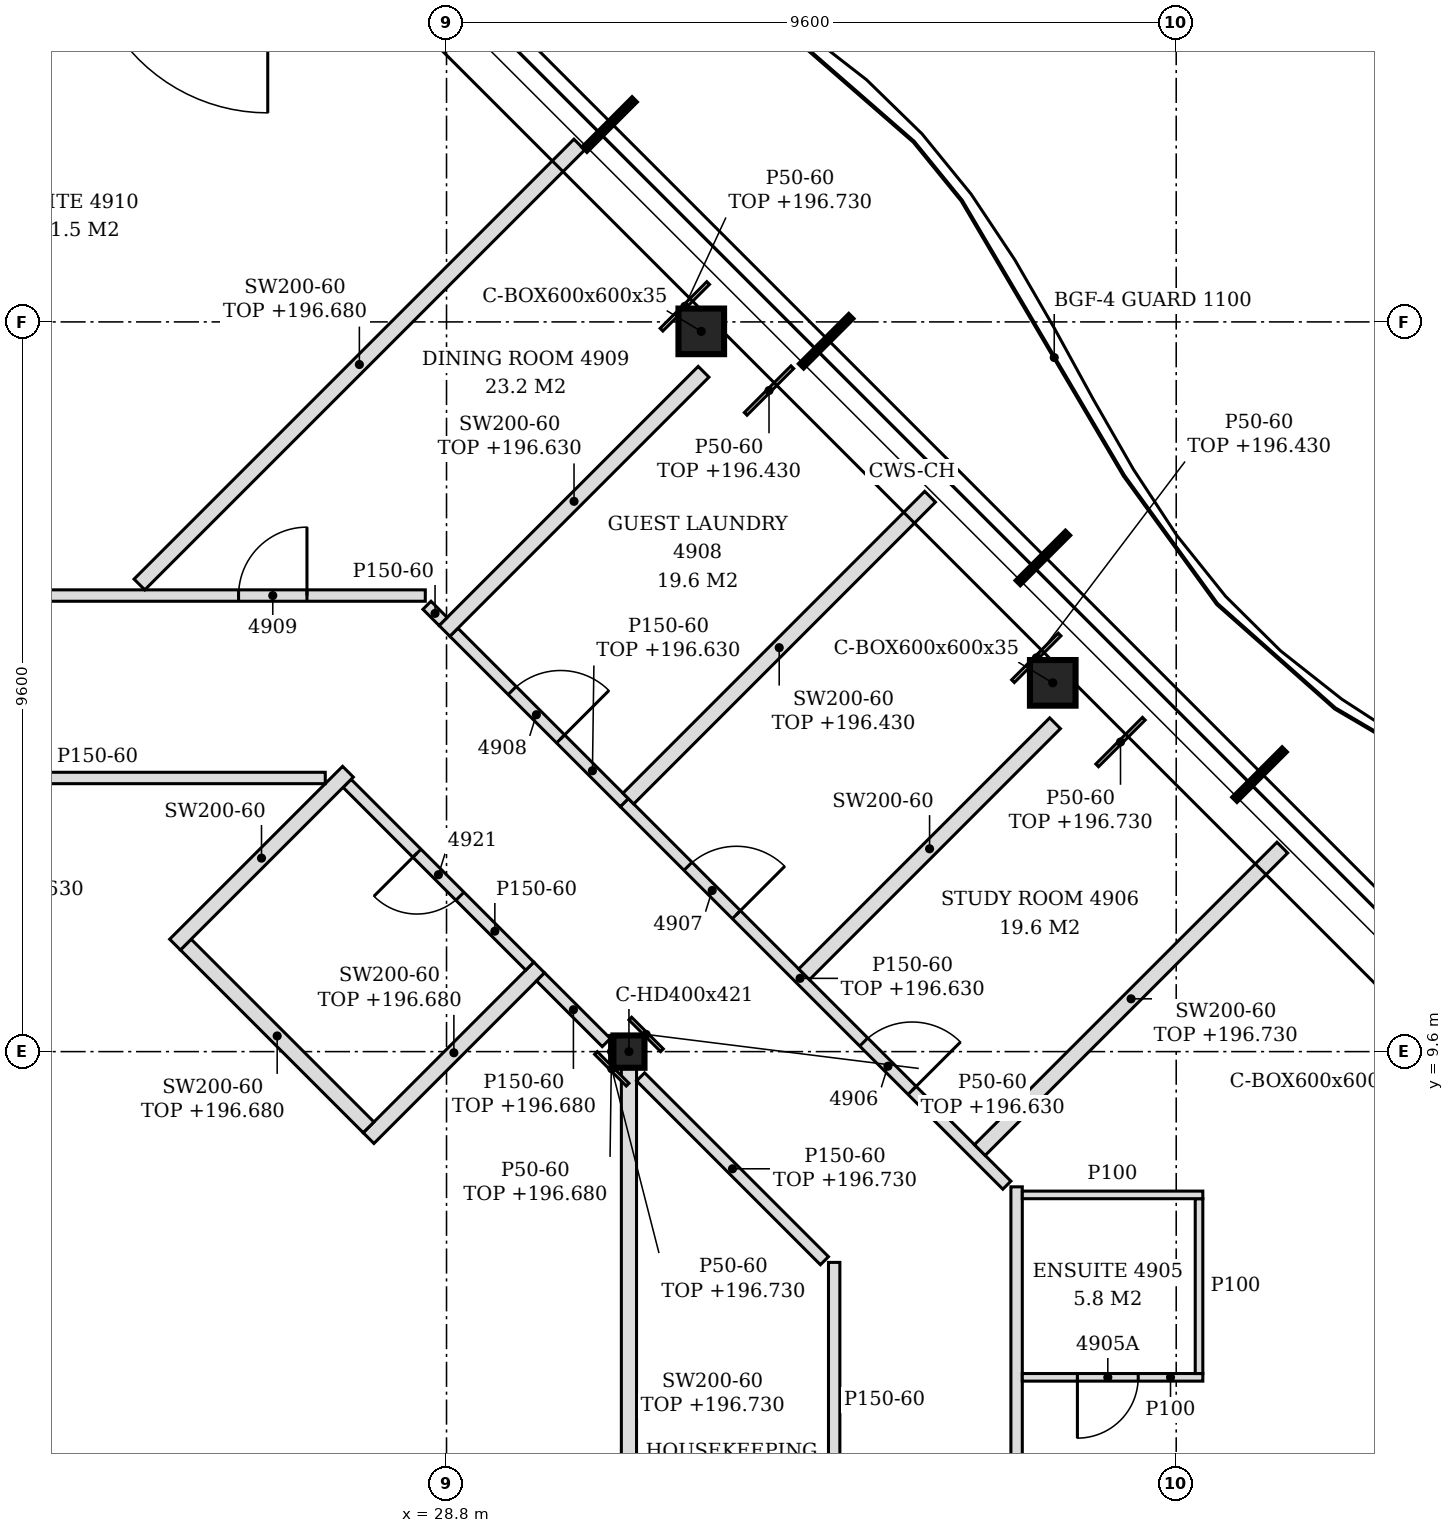
"""IFC4 building model, lengths in metres.
Left out: names, types, materials, properties, quantities, classifications, styles, units other than length and angle.
Written with IfcOpenShell. Run it as: python <this file> out.ifc"""

import sys

from ifc_helpers import new_model, si_unit, direction, frame, frame_2d, origin, origin_2d, place, context, subcontext, project, spatial, polyline, rectangle, hollow_rectangle, i_section, outline, extrude, clip, halfspace, element, fill, save


model = new_model("IFC4")
c1 = context("Model", 3, precision=1e-05, world=origin(), true_north=direction((0.0, 1.0)))
c2 = subcontext(c1, "Body", "Model", "MODEL_VIEW")
j1 = project(units=[si_unit("LENGTHUNIT", "METRE"), si_unit("PLANEANGLEUNIT", "RADIAN")], contexts=[c1])
p1 = place(None, origin())
s1 = spatial("IfcSite", under=j1, at=p1, CompositionType="ELEMENT")
p2 = place(p1, origin())
s2 = spatial("IfcBuilding", under=s1, at=p2, CompositionType="ELEMENT")
p3 = place(p2, frame((0.0, 0.0, 193.8)))
s3 = spatial("IfcBuildingStorey", under=s2, at=p3, CompositionType="ELEMENT", Elevation=193.8)
for number, where, z_axis, x_axis in (
    (1, (41.4, 9.827, -0.15), (0.183, -0.122, 0.976), (0.555, 0.832, 0.0)),
    (2, (36.776, 14.451, -0.15), (0.183, -0.122, 0.976), (0.555, 0.832, 0.0)),
):
    element("IfcColumn", number, at=place(p3, frame(where, z_axis=z_axis, x_axis=x_axis)), inside=s3, PredefinedType="COLUMN", context=c2, shape_type="Clipping", body=[
        clip(clip(extrude(hollow_rectangle(XDim=0.6, YDim=0.6, WallThickness=0.035, at=origin_2d()), origin(), (0.0, 0.0, 1.0), 3.69), halfspace(frame((0.0, 0.0, 0.021), z_axis=(0.0, 0.0, 1.0), x_axis=(1.0, 0.0, 0.0)), True)), halfspace(frame((0.0, 0.0, 3.668), z_axis=(0.0, 0.0, 1.0), x_axis=(1.0, 0.0, 0.0)), False)),
    ])
p4 = place(p3, frame((32.152, 19.076, -0.15), z_axis=(0.182857646312, -0.121927149838, 0.975549512489), x_axis=(0.554769659169, 0.83200398152, 0.0)))
e3 = element("IfcColumn", 3, at=p4, inside=s3, PredefinedType="COLUMN", context=c2, shape_type="Clipping", body=[
    clip(clip(extrude(hollow_rectangle(XDim=0.6, YDim=0.6, WallThickness=0.035, at=origin_2d()), origin(), (0.0, 0.0, 1.0), 3.69), halfspace(frame((0.0, 0.0, 0.021), z_axis=(0.0, 0.0, 1.0), x_axis=(1.0, 0.0, 0.0)), True)), halfspace(frame((0.0, 0.0, 3.668), z_axis=(0.0, 0.0, 1.0), x_axis=(1.0, 0.0, 0.0)), False)),
])
p5 = place(p3, frame((31.2, 9.6, -0.15), z_axis=(0.0, 0.0, 1.0), x_axis=(1.0, 0.0, 0.0)))
e4 = element("IfcColumn", 4, at=p5, inside=s3, PredefinedType="COLUMN", context=c2, shape_type="SweptSolid", body=[
    extrude(i_section(OverallWidth=0.409, OverallDepth=0.425, WebThickness=0.033, FlangeThickness=0.052, FilletRadius=0.015, at=origin_2d()), origin(), (0.0, 0.0, 1.0), 3.6),
])
p6 = place(p3, frame((36.3, -6.334, 0.0), z_axis=(0.0, 0.0, 1.0), x_axis=(0.0, 1.0, 0.0)))
e5 = element("IfcWall", 5, at=p6, inside=s3, PredefinedType="PARTITIONING", context=c2, shape_type="SweptSolid", body=[
    extrude(outline(polyline([(0.0, 0.0), (14.155, 0.0), (14.155, 3.45), (11.384, 3.45), (11.382, 2.93), (11.184, 2.93), (11.182, 3.45), (6.584, 3.45), (6.582, 2.93), (6.384, 2.93), (6.382, 3.45), (1.784, 3.45), (1.782, 2.93), (1.584, 2.93), (1.582, 3.45), (0.0, 3.45), (0.0, 0.0)])), frame((0.0, 0.075, 0.0), z_axis=(0.0, -1.0, 0.0), x_axis=(1.0, 0.0, 0.0)), (0.0, 0.0, 1.0), 0.15),
])
p7 = place(p6, frame((1.614, 0.0, 0.0)))
e6 = element("IfcOpeningElement", 6, at=p7, cuts=e5, PredefinedType="OPENING", context=c2, shape_type="SweptSolid", body=[
    extrude(rectangle(XDim=0.9, YDim=2.1, at=frame_2d((0.45, 1.05))), frame((0.0, 0.085, 0.0), z_axis=(0.0, -1.0, 0.0), x_axis=(1.0, 0.0, 0.0)), (0.0, 0.0, 1.0), 0.17),
])
p8 = place(p6, frame((8.729, 0.0, 0.0)))
e7 = element("IfcOpeningElement", 7, at=p8, cuts=e5, PredefinedType="OPENING", context=c2, shape_type="SweptSolid", body=[
    extrude(rectangle(XDim=0.9, YDim=2.1, at=frame_2d((0.45, 1.05))), frame((0.0, 0.085, 0.0), z_axis=(0.0, -1.0, 0.0), x_axis=(1.0, 0.0, 0.0)), (0.0, 0.0, 1.0), 0.17),
])
p9 = place(p3, frame((33.9, -1.125, 0.0), z_axis=(0.0, 0.0, 1.0), x_axis=(0.0, 1.0, 0.0)))
e8 = element("IfcWall", 8, at=p9, inside=s3, PredefinedType="PARTITIONING", context=c2, shape_type="SweptSolid", body=[
    extrude(outline(polyline([(0.0, 0.0), (7.952, 0.0), (7.952, 3.45), (6.175, 3.45), (6.173, 2.93), (5.975, 2.93), (5.973, 3.45), (1.375, 3.45), (1.373, 2.93), (1.175, 2.93), (1.173, 3.45), (0.0, 3.45), (0.0, 0.0)])), frame((0.0, 0.075, 0.0), z_axis=(0.0, -1.0, 0.0), x_axis=(1.0, 0.0, 0.0)), (0.0, 0.0, 1.0), 0.15),
])
p10 = place(p9, frame((3.435, 0.0, 0.0)))
e9 = element("IfcOpeningElement", 9, at=p10, cuts=e8, PredefinedType="OPENING", context=c2, shape_type="SweptSolid", body=[
    extrude(rectangle(XDim=0.9, YDim=2.1, at=frame_2d((0.45, 1.05))), frame((0.0, 0.085, 0.0), z_axis=(0.0, -1.0, 0.0), x_axis=(1.0, 0.0, 0.0)), (0.0, 0.0, 1.0), 0.17),
])
p11 = place(p3, frame((31.2, 0.212, 0.0), z_axis=(0.0, 0.0, 1.0), x_axis=(0.0, 1.0, 0.0)))
e10 = element("IfcWall", 10, at=p11, inside=s3, PredefinedType="PARTITIONING", context=c2, shape_type="SweptSolid", body=[
    extrude(rectangle(XDim=9.175, YDim=0.2, at=frame_2d((4.587, 0.0))), origin(), (0.0, 0.0, 1.0), 2.93),
])
p12 = place(p3, frame((36.375, 5.315, 0.0), z_axis=(0.0, 0.0, 1.0), x_axis=(1.0, 0.0, 0.0)))
e11 = element("IfcWall", 11, at=p12, inside=s3, PredefinedType="PARTITIONING", context=c2, shape_type="SweptSolid", body=[
    extrude(rectangle(XDim=2.375, YDim=0.1, at=frame_2d((1.188, 0.0))), origin(), (0.0, 0.0, 1.0), 3.45),
])
p13 = place(p12, frame((0.725, 0.0, 0.0)))
e12 = element("IfcOpeningElement", 12, at=p13, cuts=e11, PredefinedType="OPENING", context=c2, shape_type="SweptSolid", body=[
    extrude(rectangle(XDim=0.8, YDim=2.1, at=frame_2d((0.4, 1.05))), frame((0.0, 0.06, 0.0), z_axis=(0.0, -1.0, 0.0), x_axis=(1.0, 0.0, 0.0)), (0.0, 0.0, 1.0), 0.12),
])
p14 = place(p3, frame((38.7, 5.365, 0.0), z_axis=(0.0, 0.0, 1.0), x_axis=(0.0, 1.0, 0.0)))
e13 = element("IfcWall", 13, at=p14, inside=s3, PredefinedType="PARTITIONING", context=c2, shape_type="SweptSolid", body=[
    extrude(rectangle(XDim=2.3, YDim=0.1, at=frame_2d((1.15, 0.0))), origin(), (0.0, 0.0, 1.0), 3.45),
])
p15 = place(p3, frame((33.772, 6.849, 0.0), z_axis=(0.0, 0.0, 1.0), x_axis=(-0.707106781187, 0.707106781187, 0.0)))
e14 = element("IfcWall", 14, at=p15, inside=s3, PredefinedType="PARTITIONING", context=c2, shape_type="SweptSolid", body=[
    extrude(rectangle(XDim=3.421, YDim=0.15, at=frame_2d((1.71, 0.0))), origin(), (0.0, 0.0, 1.0), 2.93),
])
p16 = place(p3, frame((36.375, 7.715, 0.0), z_axis=(0.0, 0.0, 1.0), x_axis=(1.0, 0.0, 0.0)))
e15 = element("IfcWall", 15, at=p16, inside=s3, PredefinedType="PARTITIONING", context=c2, shape_type="SweptSolid", body=[
    extrude(rectangle(XDim=2.375, YDim=0.1, at=frame_2d((1.188, 0.0))), origin(), (0.0, 0.0, 1.0), 3.45),
])
p17 = place(p3, frame((36.172, 7.843, 0.0), z_axis=(0.0, 0.0, 1.0), x_axis=(-0.70712393086, 0.707089631097, 0.0)))
e16 = element("IfcWall", 16, at=p17, inside=s3, PredefinedType="PARTITIONING", context=c2, shape_type="SweptSolid", body=[
    extrude(rectangle(XDim=7.118, YDim=0.15, at=frame_2d((3.559, 0.0))), origin(), (0.0, 0.0, 1.0), 2.83),
])
p18 = place(p17, frame((1.763, 0.0, 0.0)))
e17 = element("IfcOpeningElement", 17, at=p18, cuts=e16, PredefinedType="OPENING", context=c2, shape_type="SweptSolid", body=[
    extrude(rectangle(XDim=0.9, YDim=2.1, at=frame_2d((0.45, 1.05))), frame((0.0, 0.085, 0.0), z_axis=(0.0, -1.0, 0.0), x_axis=(1.0, 0.0, 0.0)), (0.0, 0.0, 1.0), 0.17),
])
p19 = place(p17, frame((5.033, 0.0, 0.0)))
e18 = element("IfcOpeningElement", 18, at=p19, cuts=e16, PredefinedType="OPENING", context=c2, shape_type="SweptSolid", body=[
    extrude(rectangle(XDim=0.9, YDim=2.1, at=frame_2d((0.45, 1.05))), frame((0.0, 0.085, 0.0), z_axis=(0.0, -1.0, 0.0), x_axis=(1.0, 0.0, 0.0)), (0.0, 0.0, 1.0), 0.17),
])
p20 = place(p3, frame((35.816, 8.305, 0.0), z_axis=(0.0, 0.0, 1.0), x_axis=(0.707193537431, 0.707020014296, 0.0)))
e19 = element("IfcWall", 19, at=p20, inside=s3, PredefinedType="PARTITIONING", context=c2, shape_type="SweptSolid", body=[
    extrude(rectangle(XDim=5.628, YDim=0.2, at=frame_2d((2.814, 0.0))), origin(), (0.0, 0.0, 1.0), 2.93),
])
p21 = place(p3, frame((27.774, 8.462, 0.0), z_axis=(0.0, 0.0, 1.0), x_axis=(0.707106781187, 0.707106781187, 0.0)))
e20 = element("IfcWall", 20, at=p21, inside=s3, PredefinedType="PARTITIONING", context=c2, shape_type="SweptSolid", body=[
    extrude(rectangle(XDim=3.174, YDim=0.2, at=frame_2d((1.587, 0.0))), origin(), (0.0, 0.0, 1.0), 2.88),
])
p22 = place(p3, frame((27.774, 8.604, 0.0), z_axis=(0.0, 0.0, 1.0), x_axis=(-0.707142675843, 0.707070884708, 0.0)))
e21 = element("IfcWall", 21, at=p22, inside=s3, PredefinedType="PARTITIONING", context=c2, shape_type="SweptSolid", body=[
    extrude(rectangle(XDim=3.401, YDim=0.2, at=frame_2d((1.7, 0.0))), origin(), (0.0, 0.0, 1.0), 2.88),
])
p23 = place(p3, frame((30.902, 9.719, 0.0), z_axis=(0.0, 0.0, 1.0), x_axis=(-0.707406212347, 0.706807223175, 0.0)))
e22 = element("IfcWall", 22, at=p23, inside=s3, PredefinedType="PARTITIONING", context=c2, shape_type="SweptSolid", body=[
    extrude(rectangle(XDim=1.223, YDim=0.15, at=frame_2d((0.611, 0.0))), origin(), (0.0, 0.0, 1.0), 2.88),
])
p24 = place(p3, frame((33.504, 10.617, 0.0), z_axis=(0.0, 0.0, 1.0), x_axis=(0.707028369139, 0.70718518454, 0.0)))
e23 = element("IfcWall", 23, at=p24, inside=s3, PredefinedType="PARTITIONING", context=c2, shape_type="SweptSolid", body=[
    extrude(rectangle(XDim=4.671, YDim=0.2, at=frame_2d((2.335, 0.0))), origin(), (0.0, 0.0, 1.0), 3.45),
])
p25 = place(p3, frame((29.895, 10.725, 0.0), z_axis=(0.0, 0.0, 1.0), x_axis=(-0.706927244117, 0.707286272682, 0.0)))
e24 = element("IfcWall", 24, at=p25, inside=s3, PredefinedType="PARTITIONING", context=c2, shape_type="SweptSolid", body=[
    extrude(rectangle(XDim=3.4, YDim=0.15, at=frame_2d((1.7, 0.0))), origin(), (0.0, 0.0, 1.0), 3.45),
])
p26 = place(p25, frame((1.3, 0.0, 0.0)))
e25 = element("IfcOpeningElement", 25, at=p26, cuts=e24, PredefinedType="OPENING", context=c2, shape_type="SweptSolid", body=[
    extrude(rectangle(XDim=0.8, YDim=2.1, at=frame_2d((0.4, 1.05))), frame((0.0, 0.085, 0.0), z_axis=(0.0, -1.0, 0.0), x_axis=(1.0, 0.0, 0.0)), (0.0, 0.0, 1.0), 0.17),
])
p27 = place(p3, frame((25.228, 11.008, 0.0), z_axis=(0.0, 0.0, 1.0), x_axis=(0.707296501544, 0.706917009913, 0.0)))
e26 = element("IfcWall", 26, at=p27, inside=s3, PredefinedType="PARTITIONING", context=c2, shape_type="SweptSolid", body=[
    extrude(rectangle(XDim=3.217, YDim=0.2, at=frame_2d((1.608, 0.0))), origin(), (0.0, 0.0, 1.0), 3.45),
])
p28 = place(p3, frame((31.139, 12.876, 0.0), z_axis=(0.0, 0.0, 1.0), x_axis=(-0.707260784618, 0.706952744207, 0.0)))
e27 = element("IfcWall", 27, at=p28, inside=s3, PredefinedType="PARTITIONING", context=c2, shape_type="SweptSolid", body=[
    extrude(rectangle(XDim=3.17, YDim=0.15, at=frame_2d((1.585, 0.0))), origin(), (0.0, 0.0, 1.0), 2.83),
])
p29 = place(p28, frame((1.185, 0.0, 0.0)))
e28 = element("IfcOpeningElement", 28, at=p29, cuts=e27, PredefinedType="OPENING", context=c2, shape_type="SweptSolid", body=[
    extrude(rectangle(XDim=0.9, YDim=2.1, at=frame_2d((0.45, 1.05))), frame((0.0, 0.085, 0.0), z_axis=(0.0, -1.0, 0.0), x_axis=(1.0, 0.0, 0.0)), (0.0, 0.0, 1.0), 0.17),
])
p30 = place(p3, frame((31.192, 12.929, 0.0), z_axis=(0.0, 0.0, 1.0), x_axis=(0.70701981688, 0.707193734799, 0.0)))
e29 = element("IfcWall", 29, at=p30, inside=s3, PredefinedType="PARTITIONING", context=c2, shape_type="SweptSolid", body=[
    extrude(rectangle(XDim=5.615, YDim=0.2, at=frame_2d((2.808, 0.0))), origin(), (0.0, 0.0, 1.0), 2.63),
])
p31 = place(p3, frame((21.215, 13.2, 0.0), z_axis=(0.0, 0.0, 1.0), x_axis=(1.0, 0.0, 0.0)))
e30 = element("IfcWall", 30, at=p31, inside=s3, PredefinedType="PARTITIONING", context=c2, shape_type="SweptSolid", body=[
    extrude(rectangle(XDim=5.99, YDim=0.15, at=frame_2d((2.995, 0.0))), origin(), (0.0, 0.0, 1.0), 3.45),
])
p32 = place(p3, frame((28.773, 15.135, 0.0), z_axis=(0.0, 0.0, 1.0), x_axis=(0.707106781187, 0.707106781187, 0.0)))
e31 = element("IfcWall", 31, at=p32, inside=s3, PredefinedType="PARTITIONING", context=c2, shape_type="SweptSolid", body=[
    extrude(rectangle(XDim=4.821, YDim=0.2, at=frame_2d((2.411, 0.0))), origin(), (0.0, 0.0, 1.0), 2.83),
])
p33 = place(p3, frame((28.755, 15.259, 0.0), z_axis=(0.0, 0.0, 1.0), x_axis=(-0.706295414481, 0.707917217959, 0.0)))
e32 = element("IfcWall", 32, at=p33, inside=s3, PredefinedType="PARTITIONING", context=c2, shape_type="SweptSolid", body=[
    extrude(rectangle(XDim=0.301, YDim=0.15, at=frame_2d((0.15, 0.0))), origin(), (0.0, 0.0, 1.0), 3.45),
])
p34 = place(p3, frame((-4.875, 15.6, 0.0), z_axis=(0.0, 0.0, 1.0), x_axis=(1.0, 0.0, 0.0)))
e33 = element("IfcWall", 33, at=p34, inside=s3, PredefinedType="PARTITIONING", context=c2, shape_type="SweptSolid", body=[
    extrude(outline(polyline([(0.0, 0.0), (33.396, 0.0), (33.396, 3.45), (24.225, 3.45), (24.223, 2.83), (23.925, 2.83), (23.923, 3.45), (12.225, 3.45), (12.223, 2.83), (11.925, 2.83), (11.923, 3.45), (0.225, 3.45), (0.223, 3.03), (0.0, 3.03), (0.0, 0.0)])), frame((0.0, 0.075, 0.0), z_axis=(0.0, -1.0, 0.0), x_axis=(1.0, 0.0, 0.0)), (0.0, 0.0, 1.0), 0.15),
])
p35 = place(p34, frame((30.939, 0.0, 0.0)))
e34 = element("IfcOpeningElement", 34, at=p35, cuts=e33, PredefinedType="OPENING", context=c2, shape_type="SweptSolid", body=[
    extrude(rectangle(XDim=0.9, YDim=2.1, at=frame_2d((0.45, 1.05))), frame((0.0, 0.085, 0.0), z_axis=(0.0, -1.0, 0.0), x_axis=(1.0, 0.0, 0.0)), (0.0, 0.0, 1.0), 0.17),
])
p36 = place(p34, frame((27.188, 0.0, 0.0)))
e35 = element("IfcOpeningElement", 35, at=p36, cuts=e33, PredefinedType="OPENING", context=c2, shape_type="SweptSolid", body=[
    extrude(rectangle(XDim=0.9, YDim=2.1, at=frame_2d((0.45, 1.05))), frame((0.0, 0.085, 0.0), z_axis=(0.0, -1.0, 0.0), x_axis=(1.0, 0.0, 0.0)), (0.0, 0.0, 1.0), 0.17),
])
p37 = place(p34, frame((19.463, 0.0, 0.0)))
e36 = element("IfcOpeningElement", 36, at=p37, cuts=e33, PredefinedType="OPENING", context=c2, shape_type="SweptSolid", body=[
    extrude(rectangle(XDim=0.9, YDim=2.1, at=frame_2d((0.45, 1.05))), frame((0.0, 0.085, 0.0), z_axis=(0.0, -1.0, 0.0), x_axis=(1.0, 0.0, 0.0)), (0.0, 0.0, 1.0), 0.17),
])
p38 = place(p34, frame((5.406, 0.0, 0.0)))
e37 = element("IfcOpeningElement", 37, at=p38, cuts=e33, PredefinedType="OPENING", context=c2, shape_type="SweptSolid", body=[
    extrude(rectangle(XDim=0.9, YDim=2.1, at=frame_2d((0.45, 1.05))), frame((0.0, 0.085, 0.0), z_axis=(0.0, -1.0, 0.0), x_axis=(1.0, 0.0, 0.0)), (0.0, 0.0, 1.0), 0.17),
])
p39 = place(p3, frame((24.76, 15.746, 0.0), z_axis=(0.0, 0.0, 1.0), x_axis=(0.707106781187, 0.707106781187, 0.0)))
e38 = element("IfcWall", 38, at=p39, inside=s3, PredefinedType="PARTITIONING", context=c2, shape_type="SweptSolid", body=[
    extrude(rectangle(XDim=8.185, YDim=0.2, at=frame_2d((4.092, 0.0))), origin(), (0.0, 0.0, 1.0), 2.88),
])
p40 = place(p3, frame((30.97, 9.387, 0.0), z_axis=(0.0, 0.0, 1.0), x_axis=(0.0, 1.0, 0.0)))
e39 = element("IfcWall", 39, at=p40, inside=s3, PredefinedType="PARTITIONING", context=c2, shape_type="SweptSolid", body=[
    extrude(rectangle(XDim=0.425, YDim=0.05, at=frame_2d((0.212, 0.0))), origin(), (0.0, 0.0, 1.0), 2.88),
])
p41 = place(p3, frame((31.183, 9.165, 0.0), z_axis=(0.0, 0.0, 1.0), x_axis=(-0.707520656867, 0.70669266312, 0.0)))
e40 = element("IfcWall", 40, at=p41, inside=s3, PredefinedType="PARTITIONING", context=c2, shape_type="SweptSolid", body=[
    extrude(rectangle(XDim=0.59, YDim=0.05, at=frame_2d((0.295, 0.0))), origin(), (0.0, 0.0, 1.0), 2.93),
])
p42 = place(p3, frame((31.635, 9.618, 0.0), z_axis=(0.0, 0.0, 1.0), x_axis=(-0.707520656867, 0.70669266312, 0.0)))
e41 = element("IfcWall", 41, at=p42, inside=s3, PredefinedType="PARTITIONING", context=c2, shape_type="SweptSolid", body=[
    extrude(rectangle(XDim=0.59, YDim=0.05, at=frame_2d((0.295, 0.0))), origin(), (0.0, 0.0, 1.0), 2.83),
])
p43 = place(p3, frame((37.36, 13.366, 0.0), z_axis=(0.0, 0.0, 1.0), x_axis=(0.707106781187, 0.707106781187, 0.0)))
e42 = element("IfcWall", 42, at=p43, inside=s3, PredefinedType="PARTITIONING", context=c2, shape_type="SweptSolid", body=[
    extrude(rectangle(XDim=0.868, YDim=0.05, at=frame_2d((0.434, 0.0))), origin(), (0.0, 0.0, 1.0), 2.93),
])
p44 = place(p3, frame((36.253, 14.473, 0.0), z_axis=(0.0, 0.0, 1.0), x_axis=(0.706966105416, 0.707247428976, 0.0)))
e43 = element("IfcWall", 43, at=p44, inside=s3, PredefinedType="PARTITIONING", context=c2, shape_type="SweptSolid", body=[
    extrude(rectangle(XDim=0.868, YDim=0.05, at=frame_2d((0.434, 0.0))), origin(), (0.0, 0.0, 1.0), 2.63),
])
p45 = place(p3, frame((31.628, 19.098, 0.0), z_axis=(0.0, 0.0, 1.0), x_axis=(0.707106781187, 0.707106781187, 0.0)))
e44 = element("IfcWall", 44, at=p45, inside=s3, PredefinedType="PARTITIONING", context=c2, shape_type="SweptSolid", body=[
    extrude(rectangle(XDim=0.868, YDim=0.05, at=frame_2d((0.434, 0.0))), origin(), (0.0, 0.0, 1.0), 2.93),
])
p46 = place(p3, frame((32.736, 17.99, 0.0), z_axis=(0.0, 0.0, 1.0), x_axis=(0.707106781187, 0.707106781187, 0.0)))
e45 = element("IfcWall", 45, at=p46, inside=s3, PredefinedType="PARTITIONING", context=c2, shape_type="SweptSolid", body=[
    extrude(rectangle(XDim=0.868, YDim=0.05, at=frame_2d((0.434, 0.0))), origin(), (0.0, 0.0, 1.0), 2.63),
])
p47 = place(p13, frame((0.8, 0.0, 0.0), z_axis=(0.0, 0.0, 1.0), x_axis=(-1.0, 0.0, 0.0)))
e46 = element("IfcDoor", 46, at=p47, inside=s3, OperationType="SINGLE_SWING_RIGHT", PredefinedType="DOOR", context=c2, shape_type="SweptSolid", body=[
    extrude(rectangle(XDim=0.8, YDim=2.1, at=frame_2d((0.4, 1.05))), frame((0.0, 0.025, 0.0), z_axis=(0.0, -1.0, 0.0), x_axis=(1.0, 0.0, 0.0)), (0.0, 0.0, 1.0), 0.05),
])
fill(e12, e46)
p48 = place(p18, frame((0.9, 0.0, 0.0), z_axis=(0.0, 0.0, 1.0), x_axis=(-1.0, 0.0, 0.0)))
e47 = element("IfcDoor", 47, at=p48, inside=s3, OperationType="SINGLE_SWING_RIGHT", PredefinedType="DOOR", context=c2, shape_type="SweptSolid", body=[
    extrude(rectangle(XDim=0.9, YDim=2.1, at=frame_2d((0.45, 1.05))), frame((0.0, 0.025, 0.0), z_axis=(0.0, -1.0, 0.0), x_axis=(1.0, 0.0, 0.0)), (0.0, 0.0, 1.0), 0.05),
])
fill(e17, e47)
p49 = place(p19, frame((0.9, 0.0, 0.0), z_axis=(0.0, 0.0, 1.0), x_axis=(-1.0, 0.0, 0.0)))
e48 = element("IfcDoor", 48, at=p49, inside=s3, OperationType="SINGLE_SWING_RIGHT", PredefinedType="DOOR", context=c2, shape_type="SweptSolid", body=[
    extrude(rectangle(XDim=0.9, YDim=2.1, at=frame_2d((0.45, 1.05))), frame((0.0, 0.025, 0.0), z_axis=(0.0, -1.0, 0.0), x_axis=(1.0, 0.0, 0.0)), (0.0, 0.0, 1.0), 0.05),
])
fill(e18, e48)
p50 = place(p29, frame((0.9, 0.0, 0.0), z_axis=(0.0, 0.0, 1.0), x_axis=(-1.0, 0.0, 0.0)))
e49 = element("IfcDoor", 49, at=p50, inside=s3, OperationType="SINGLE_SWING_RIGHT", PredefinedType="DOOR", context=c2, shape_type="SweptSolid", body=[
    extrude(rectangle(XDim=0.9, YDim=2.1, at=frame_2d((0.45, 1.05))), frame((0.0, 0.025, 0.0), z_axis=(0.0, -1.0, 0.0), x_axis=(1.0, 0.0, 0.0)), (0.0, 0.0, 1.0), 0.05),
])
fill(e28, e49)
p51 = place(p35, origin())
e50 = element("IfcDoor", 50, at=p51, inside=s3, OperationType="SINGLE_SWING_RIGHT", PredefinedType="DOOR", context=c2, shape_type="SweptSolid", body=[
    extrude(rectangle(XDim=0.9, YDim=2.1, at=frame_2d((0.45, 1.05))), frame((0.0, 0.025, 0.0), z_axis=(0.0, -1.0, 0.0), x_axis=(1.0, 0.0, 0.0)), (0.0, 0.0, 1.0), 0.05),
])
fill(e34, e50)
p52 = place(p26, origin())
e51 = element("IfcDoor", 51, at=p52, inside=s3, OperationType="SINGLE_SWING_RIGHT", PredefinedType="DOOR", context=c2, shape_type="SweptSolid", body=[
    extrude(rectangle(XDim=0.8, YDim=2.1, at=frame_2d((0.4, 1.05))), frame((0.0, 0.025, 0.0), z_axis=(0.0, -1.0, 0.0), x_axis=(1.0, 0.0, 0.0)), (0.0, 0.0, 1.0), 0.05),
])
fill(e25, e51)
save(model, sys.argv[1])
